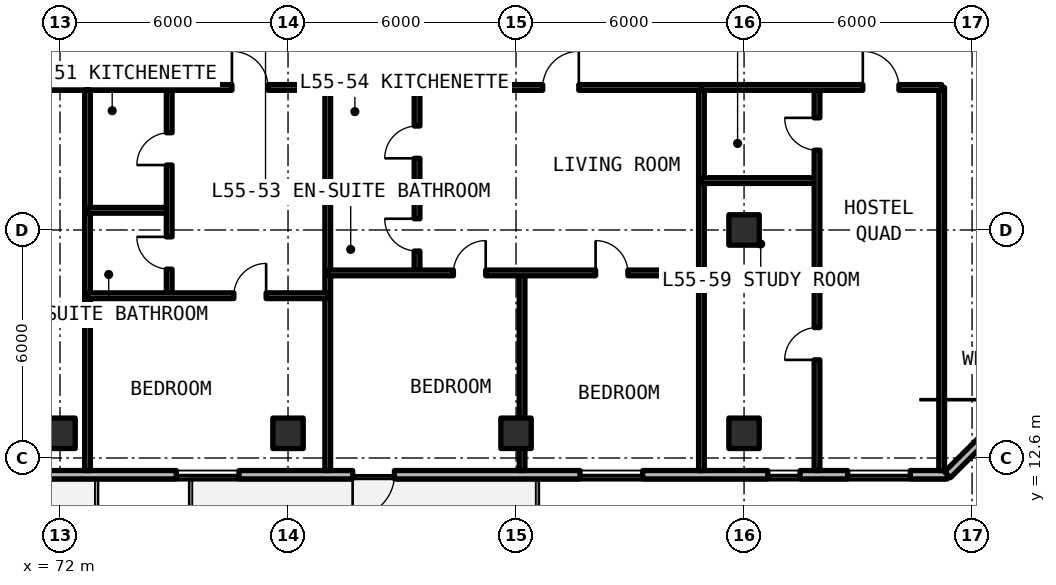
"""IFC4 building model, lengths in metres.
Left out: names, types, materials, properties, quantities, classifications, styles, units other than length and angle.
Written with IfcOpenShell. Run it as: python <this file> out.ifc"""

import sys

from ifc_helpers import new_model, si_unit, direction, frame, frame_2d, origin, origin_2d, place, context, subcontext, project, spatial, rectangle, extrude, element, fill, save


model = new_model("IFC4")
c1 = context("Model", 3, precision=1e-05, world=origin(), true_north=direction((0.0, 1.0)))
c2 = subcontext(c1, "Body", "Model", "MODEL_VIEW")
j1 = project(units=[si_unit("LENGTHUNIT", "METRE"), si_unit("PLANEANGLEUNIT", "RADIAN")], contexts=[c1])
p1 = place(None, origin())
s1 = spatial("IfcSite", under=j1, at=p1, CompositionType="ELEMENT")
p2 = place(p1, origin())
s2 = spatial("IfcBuilding", under=s1, at=p2, CompositionType="ELEMENT")
p3 = place(p2, frame((0.0, 0.0, 198.33)))
s3 = spatial("IfcBuildingStorey", under=s2, at=p3, CompositionType="ELEMENT", Elevation=198.33)
for number, where, z_axis, x_axis in (
    (1, (90.0, 18.6, 0.0), (0.0, 0.0, 1.0), (1.0, 0.0, 0.0)),
    (2, (72.0, 13.25, 0.0), (0.0, 0.0, 1.0), (1.0, 0.0, 0.0)),
    (3, (78.0, 13.25, 0.0), (0.0, 0.0, 1.0), (1.0, 0.0, 0.0)),
    (4, (84.0, 13.25, 0.0), (0.0, 0.0, 1.0), (1.0, 0.0, 0.0)),
    (5, (90.0, 13.25, 0.0), (0.0, 0.0, 1.0), (1.0, 0.0, 0.0)),
):
    element("IfcColumn", number, at=place(p3, frame(where, z_axis=z_axis, x_axis=x_axis)), inside=s3, PredefinedType="COLUMN", context=c2, shape_type="SweptSolid", body=[
        extrude(rectangle(XDim=0.8, YDim=0.8, at=origin_2d()), origin(), (0.0, 0.0, 1.0), 3.3),
    ])
p4 = place(p3, frame((52.11, 12.16, 0.0), z_axis=(0.0, 0.0, 1.0), x_axis=(1.0, 0.0, 0.0)))
e6 = element("IfcWall", 6, at=p4, inside=s3, PredefinedType="SOLIDWALL", context=c2, shape_type="SweptSolid", body=[
    extrude(rectangle(XDim=43.244, YDim=0.22, at=frame_2d((21.622, 0.0))), origin(), (0.0, 0.0, 1.0), 3.08),
])
p5 = place(p4, frame((15.74, 0.0, 0.0)))
e7 = element("IfcOpeningElement", 7, at=p5, cuts=e6, PredefinedType="OPENING", context=c2, shape_type="SweptSolid", body=[
    extrude(rectangle(XDim=1.1, YDim=2.15, at=frame_2d((0.55, 1.075))), frame((0.0, 0.12, 0.0), z_axis=(0.0, -1.0, 0.0), x_axis=(1.0, 0.0, 0.0)), (0.0, 0.0, 1.0), 0.24),
])
p6 = place(p4, frame((27.59, 0.0, 0.0)))
e8 = element("IfcOpeningElement", 8, at=p6, cuts=e6, PredefinedType="OPENING", context=c2, shape_type="SweptSolid", body=[
    extrude(rectangle(XDim=1.1, YDim=2.15, at=frame_2d((0.55, 1.075))), frame((0.0, 0.12, 0.0), z_axis=(0.0, -1.0, 0.0), x_axis=(1.0, 0.0, 0.0)), (0.0, 0.0, 1.0), 0.24),
])
p7 = place(p4, frame((2.795, 0.0, 0.78)))
e9 = element("IfcOpeningElement", 9, at=p7, cuts=e6, PredefinedType="OPENING", context=c2, shape_type="SweptSolid", body=[
    extrude(rectangle(XDim=1.65, YDim=1.66, at=frame_2d((0.825, 0.83))), frame((0.0, 0.12, 0.0), z_axis=(0.0, -1.0, 0.0), x_axis=(1.0, 0.0, 0.0)), (0.0, 0.0, 1.0), 0.24),
])
p8 = place(p4, frame((6.185, 0.0, 0.78)))
e10 = element("IfcOpeningElement", 10, at=p8, cuts=e6, PredefinedType="OPENING", context=c2, shape_type="SweptSolid", body=[
    extrude(rectangle(XDim=0.85, YDim=1.65, at=frame_2d((0.425, 0.825))), frame((0.0, 0.12, 0.0), z_axis=(0.0, -1.0, 0.0), x_axis=(1.0, 0.0, 0.0)), (0.0, 0.0, 1.0), 0.24),
])
p9 = place(p4, frame((10.562, 0.0, 0.78)))
e11 = element("IfcOpeningElement", 11, at=p9, cuts=e6, PredefinedType="OPENING", context=c2, shape_type="SweptSolid", body=[
    extrude(rectangle(XDim=0.85, YDim=1.65, at=frame_2d((0.425, 0.825))), frame((0.0, 0.12, 0.0), z_axis=(0.0, -1.0, 0.0), x_axis=(1.0, 0.0, 0.0)), (0.0, 0.0, 1.0), 0.24),
])
p10 = place(p4, frame((22.949, 0.0, 0.78)))
e12 = element("IfcOpeningElement", 12, at=p10, cuts=e6, PredefinedType="OPENING", context=c2, shape_type="SweptSolid", body=[
    extrude(rectangle(XDim=1.65, YDim=1.66, at=frame_2d((0.825, 0.83))), frame((0.0, 0.12, 0.0), z_axis=(0.0, -1.0, 0.0), x_axis=(1.0, 0.0, 0.0)), (0.0, 0.0, 1.0), 0.24),
])
p11 = place(p4, frame((33.573, 0.0, 0.78)))
e13 = element("IfcOpeningElement", 13, at=p11, cuts=e6, PredefinedType="OPENING", context=c2, shape_type="SweptSolid", body=[
    extrude(rectangle(XDim=1.65, YDim=1.66, at=frame_2d((0.825, 0.83))), frame((0.0, 0.12, 0.0), z_axis=(0.0, -1.0, 0.0), x_axis=(1.0, 0.0, 0.0)), (0.0, 0.0, 1.0), 0.24),
])
p12 = place(p4, frame((38.514, 0.0, 0.78)))
e14 = element("IfcOpeningElement", 14, at=p12, cuts=e6, PredefinedType="OPENING", context=c2, shape_type="SweptSolid", body=[
    extrude(rectangle(XDim=0.85, YDim=1.65, at=frame_2d((0.425, 0.825))), frame((0.0, 0.12, 0.0), z_axis=(0.0, -1.0, 0.0), x_axis=(1.0, 0.0, 0.0)), (0.0, 0.0, 1.0), 0.24),
])
p13 = place(p4, frame((40.615, 0.0, 0.78)))
e15 = element("IfcOpeningElement", 15, at=p13, cuts=e6, PredefinedType="OPENING", context=c2, shape_type="SweptSolid", body=[
    extrude(rectangle(XDim=1.65, YDim=1.66, at=frame_2d((0.825, 0.83))), frame((0.0, 0.12, 0.0), z_axis=(0.0, -1.0, 0.0), x_axis=(1.0, 0.0, 0.0)), (0.0, 0.0, 1.0), 0.24),
])
p14 = place(p3, frame((95.354, 12.16, 0.0), z_axis=(0.0, 0.0, 1.0), x_axis=(0.707085909342, 0.707127652415, 0.0)))
e16 = element("IfcWall", 16, at=p14, inside=s3, PredefinedType="SOLIDWALL", context=c2, shape_type="SweptSolid", body=[
    extrude(rectangle(XDim=5.849, YDim=0.22, at=frame_2d((2.924, 0.0))), origin(), (0.0, 0.0, 1.0), 3.08),
])
p15 = place(p14, frame((1.224, 0.0, 0.78)))
e17 = element("IfcOpeningElement", 17, at=p15, cuts=e16, PredefinedType="OPENING", context=c2, shape_type="SweptSolid", body=[
    extrude(rectangle(XDim=3.4, YDim=1.66, at=frame_2d((1.7, 0.83))), frame((0.0, 0.12, 0.0), z_axis=(0.0, -1.0, 0.0), x_axis=(1.0, 0.0, 0.0)), (0.0, 0.0, 1.0), 0.24),
])
for number, where, z_axis, x_axis in (
    (18, (95.2, 12.27, 0.0), (0.0, 0.0, 1.0), (0.0, 1.0, 0.0)),
    (19, (72.723, 12.27, 0.0), (0.0, 0.0, 1.0), (0.0, 1.0, 0.0)),
):
    element("IfcWall", number, at=place(p3, frame(where, z_axis=z_axis, x_axis=x_axis)), inside=s3, PredefinedType="SOLIDWALL", context=c2, shape_type="SweptSolid", body=[
        extrude(rectangle(XDim=10.08, YDim=0.15, at=frame_2d((5.04, 0.0))), origin(), (0.0, 0.0, 1.0), 2.35),
    ])
p16 = place(p3, frame((64.295, 22.35, 0.0), z_axis=(0.0, 0.0, 1.0), x_axis=(1.0, 0.0, 0.0)))
e20 = element("IfcWall", 20, at=p16, inside=s3, PredefinedType="SOLIDWALL", context=c2, shape_type="SweptSolid", body=[
    extrude(rectangle(XDim=8.428, YDim=0.15, at=frame_2d((4.214, 0.0))), origin(), (0.0, 0.0, 1.0), 2.35),
])
p17 = place(p16, frame((3.664, 0.0, 0.0)))
e21 = element("IfcOpeningElement", 21, at=p17, cuts=e20, PredefinedType="OPENING", context=c2, shape_type="SweptSolid", body=[
    extrude(rectangle(XDim=1.1, YDim=2.15, at=frame_2d((0.55, 1.075))), frame((0.0, 0.085, 0.0), z_axis=(0.0, -1.0, 0.0), x_axis=(1.0, 0.0, 0.0)), (0.0, 0.0, 1.0), 0.17),
])
p18 = place(p3, frame((79.045, 12.27, 0.0), z_axis=(0.0, 0.0, 1.0), x_axis=(0.0, 1.0, 0.0)))
e22 = element("IfcWall", 22, at=p18, inside=s3, PredefinedType="SOLIDWALL", context=c2, shape_type="SweptSolid", body=[
    extrude(rectangle(XDim=10.08, YDim=0.15, at=frame_2d((5.04, 0.0))), origin(), (0.0, 0.0, 1.0), 2.35),
])
p19 = place(p3, frame((72.723, 19.117, 0.0), z_axis=(0.0, 0.0, 1.0), x_axis=(1.0, 0.0, 0.0)))
e23 = element("IfcWall", 23, at=p19, inside=s3, PredefinedType="PARTITIONING", context=c2, shape_type="SweptSolid", body=[
    extrude(rectangle(XDim=2.149, YDim=0.15, at=frame_2d((1.075, 0.0))), origin(), (0.0, 0.0, 1.0), 2.35),
])
p20 = place(p3, frame((74.873, 16.87, 0.0), z_axis=(0.0, 0.0, 1.0), x_axis=(0.0, 1.0, 0.0)))
e24 = element("IfcWall", 24, at=p20, inside=s3, PredefinedType="PARTITIONING", context=c2, shape_type="SweptSolid", body=[
    extrude(rectangle(XDim=5.48, YDim=0.15, at=frame_2d((2.74, 0.0))), origin(), (0.0, 0.0, 1.0), 2.35),
])
p21 = place(p20, frame((0.698, 0.0, 0.0)))
e25 = element("IfcOpeningElement", 25, at=p21, cuts=e24, PredefinedType="OPENING", context=c2, shape_type="SweptSolid", body=[
    extrude(rectangle(XDim=0.85, YDim=2.1, at=frame_2d((0.425, 1.05))), frame((0.0, 0.085, 0.0), z_axis=(0.0, -1.0, 0.0), x_axis=(1.0, 0.0, 0.0)), (0.0, 0.0, 1.0), 0.17),
])
p22 = place(p20, frame((3.438, 0.0, 0.0)))
e26 = element("IfcOpeningElement", 26, at=p22, cuts=e24, PredefinedType="OPENING", context=c2, shape_type="SweptSolid", body=[
    extrude(rectangle(XDim=0.85, YDim=2.1, at=frame_2d((0.425, 1.05))), frame((0.0, 0.085, 0.0), z_axis=(0.0, -1.0, 0.0), x_axis=(1.0, 0.0, 0.0)), (0.0, 0.0, 1.0), 0.17),
])
p23 = place(p3, frame((72.723, 16.87, 0.0), z_axis=(0.0, 0.0, 1.0), x_axis=(1.0, 0.0, 0.0)))
e27 = element("IfcWall", 27, at=p23, inside=s3, PredefinedType="PARTITIONING", context=c2, shape_type="SweptSolid", body=[
    extrude(rectangle(XDim=6.322, YDim=0.15, at=frame_2d((3.161, 0.0))), origin(), (0.0, 0.0, 1.0), 2.35),
])
p24 = place(p23, frame((3.85, 0.0, 0.0)))
e28 = element("IfcOpeningElement", 28, at=p24, cuts=e27, PredefinedType="OPENING", context=c2, shape_type="SweptSolid", body=[
    extrude(rectangle(XDim=0.85, YDim=2.1, at=frame_2d((0.425, 1.05))), frame((0.0, 0.085, 0.0), z_axis=(0.0, -1.0, 0.0), x_axis=(1.0, 0.0, 0.0)), (0.0, 0.0, 1.0), 0.17),
])
p25 = place(p3, frame((72.723, 22.35, 0.0), z_axis=(0.0, 0.0, 1.0), x_axis=(1.0, 0.0, 0.0)))
e29 = element("IfcWall", 29, at=p25, inside=s3, PredefinedType="SOLIDWALL", context=c2, shape_type="SweptSolid", body=[
    extrude(rectangle(XDim=6.322, YDim=0.15, at=frame_2d((3.161, 0.0))), origin(), (0.0, 0.0, 1.0), 2.35),
])
p26 = place(p25, frame((3.8, 0.0, 0.0)))
e30 = element("IfcOpeningElement", 30, at=p26, cuts=e29, PredefinedType="OPENING", context=c2, shape_type="SweptSolid", body=[
    extrude(rectangle(XDim=0.95, YDim=2.15, at=frame_2d((0.475, 1.075))), frame((0.0, 0.085, 0.0), z_axis=(0.0, -1.0, 0.0), x_axis=(1.0, 0.0, 0.0)), (0.0, 0.0, 1.0), 0.17),
])
p27 = place(p3, frame((88.878, 12.27, 0.0), z_axis=(0.0, 0.0, 1.0), x_axis=(0.0, 1.0, 0.0)))
e31 = element("IfcWall", 31, at=p27, inside=s3, PredefinedType="SOLIDWALL", context=c2, shape_type="SweptSolid", body=[
    extrude(rectangle(XDim=10.08, YDim=0.15, at=frame_2d((5.04, 0.0))), origin(), (0.0, 0.0, 1.0), 2.35),
])
p28 = place(p3, frame((79.045, 19.471, 0.0), z_axis=(0.0, 0.0, 1.0), x_axis=(1.0, 0.0, 0.0)))
e32 = element("IfcWall", 32, at=p28, inside=s3, PredefinedType="PARTITIONING", context=c2, shape_type="SweptSolid", body=[
    extrude(rectangle(XDim=2.35, YDim=0.15, at=frame_2d((1.175, 0.0))), origin(), (0.0, 0.0, 1.0), 2.35),
])
p29 = place(p3, frame((81.395, 17.47, 0.0), z_axis=(0.0, 0.0, 1.0), x_axis=(0.0, 1.0, 0.0)))
e33 = element("IfcWall", 33, at=p29, inside=s3, PredefinedType="PARTITIONING", context=c2, shape_type="SweptSolid", body=[
    extrude(rectangle(XDim=4.88, YDim=0.15, at=frame_2d((2.44, 0.0))), origin(), (0.0, 0.0, 1.0), 2.35),
])
p30 = place(p29, frame((0.575, 0.0, 0.0)))
e34 = element("IfcOpeningElement", 34, at=p30, cuts=e33, PredefinedType="OPENING", context=c2, shape_type="SweptSolid", body=[
    extrude(rectangle(XDim=0.85, YDim=2.1, at=frame_2d((0.425, 1.05))), frame((0.0, 0.085, 0.0), z_axis=(0.0, -1.0, 0.0), x_axis=(1.0, 0.0, 0.0)), (0.0, 0.0, 1.0), 0.17),
])
p31 = place(p29, frame((3.015, 0.0, 0.0)))
e35 = element("IfcOpeningElement", 35, at=p31, cuts=e33, PredefinedType="OPENING", context=c2, shape_type="SweptSolid", body=[
    extrude(rectangle(XDim=0.85, YDim=2.1, at=frame_2d((0.425, 1.05))), frame((0.0, 0.085, 0.0), z_axis=(0.0, -1.0, 0.0), x_axis=(1.0, 0.0, 0.0)), (0.0, 0.0, 1.0), 0.17),
])
p32 = place(p3, frame((84.158, 12.27, 0.0), z_axis=(0.0, 0.0, 1.0), x_axis=(0.0, 1.0, 0.0)))
e36 = element("IfcWall", 36, at=p32, inside=s3, PredefinedType="PARTITIONING", context=c2, shape_type="SweptSolid", body=[
    extrude(rectangle(XDim=5.2, YDim=0.15, at=frame_2d((2.6, 0.0))), origin(), (0.0, 0.0, 1.0), 2.35),
])
p33 = place(p3, frame((79.045, 17.47, 0.0), z_axis=(0.0, 0.0, 1.0), x_axis=(1.0, 0.0, 0.0)))
e37 = element("IfcWall", 37, at=p33, inside=s3, PredefinedType="PARTITIONING", context=c2, shape_type="SweptSolid", body=[
    extrude(rectangle(XDim=9.833, YDim=0.15, at=frame_2d((4.917, 0.0))), origin(), (0.0, 0.0, 1.0), 2.35),
])
p34 = place(p33, frame((3.307, 0.0, 0.0)))
e38 = element("IfcOpeningElement", 38, at=p34, cuts=e37, PredefinedType="OPENING", context=c2, shape_type="SweptSolid", body=[
    extrude(rectangle(XDim=0.85, YDim=2.1, at=frame_2d((0.425, 1.05))), frame((0.0, 0.085, 0.0), z_axis=(0.0, -1.0, 0.0), x_axis=(1.0, 0.0, 0.0)), (0.0, 0.0, 1.0), 0.17),
])
p35 = place(p33, frame((7.048, 0.0, 0.0)))
e39 = element("IfcOpeningElement", 39, at=p35, cuts=e37, PredefinedType="OPENING", context=c2, shape_type="SweptSolid", body=[
    extrude(rectangle(XDim=0.85, YDim=2.1, at=frame_2d((0.425, 1.05))), frame((0.0, 0.085, 0.0), z_axis=(0.0, -1.0, 0.0), x_axis=(1.0, 0.0, 0.0)), (0.0, 0.0, 1.0), 0.17),
])
p36 = place(p3, frame((79.045, 22.35, 0.0), z_axis=(0.0, 0.0, 1.0), x_axis=(1.0, 0.0, 0.0)))
e40 = element("IfcWall", 40, at=p36, inside=s3, PredefinedType="SOLIDWALL", context=c2, shape_type="SweptSolid", body=[
    extrude(rectangle(XDim=9.833, YDim=0.15, at=frame_2d((4.917, 0.0))), origin(), (0.0, 0.0, 1.0), 2.35),
])
p37 = place(p36, frame((5.657, 0.0, 0.0)))
e41 = element("IfcOpeningElement", 41, at=p37, cuts=e40, PredefinedType="OPENING", context=c2, shape_type="SweptSolid", body=[
    extrude(rectangle(XDim=0.95, YDim=2.15, at=frame_2d((0.475, 1.075))), frame((0.0, 0.085, 0.0), z_axis=(0.0, -1.0, 0.0), x_axis=(1.0, 0.0, 0.0)), (0.0, 0.0, 1.0), 0.17),
])
p38 = place(p3, frame((88.878, 19.9, 0.0), z_axis=(0.0, 0.0, 1.0), x_axis=(1.0, 0.0, 0.0)))
e42 = element("IfcWall", 42, at=p38, inside=s3, PredefinedType="PARTITIONING", context=c2, shape_type="SweptSolid", body=[
    extrude(rectangle(XDim=3.042, YDim=0.15, at=frame_2d((1.521, 0.0))), origin(), (0.0, 0.0, 1.0), 2.35),
])
p39 = place(p3, frame((91.92, 12.27, 0.0), z_axis=(0.0, 0.0, 1.0), x_axis=(0.0, 1.0, 0.0)))
e43 = element("IfcWall", 43, at=p39, inside=s3, PredefinedType="PARTITIONING", context=c2, shape_type="SweptSolid", body=[
    extrude(rectangle(XDim=10.08, YDim=0.15, at=frame_2d((5.04, 0.0))), origin(), (0.0, 0.0, 1.0), 2.35),
])
p40 = place(p39, frame((2.912, 0.0, 0.0)))
e44 = element("IfcOpeningElement", 44, at=p40, cuts=e43, PredefinedType="OPENING", context=c2, shape_type="SweptSolid", body=[
    extrude(rectangle(XDim=0.85, YDim=2.1, at=frame_2d((0.425, 1.05))), frame((0.0, 0.085, 0.0), z_axis=(0.0, -1.0, 0.0), x_axis=(1.0, 0.0, 0.0)), (0.0, 0.0, 1.0), 0.17),
])
p41 = place(p39, frame((8.43, 0.0, 0.0)))
e45 = element("IfcOpeningElement", 45, at=p41, cuts=e43, PredefinedType="OPENING", context=c2, shape_type="SweptSolid", body=[
    extrude(rectangle(XDim=0.85, YDim=2.1, at=frame_2d((0.425, 1.05))), frame((0.0, 0.085, 0.0), z_axis=(0.0, -1.0, 0.0), x_axis=(1.0, 0.0, 0.0)), (0.0, 0.0, 1.0), 0.17),
])
p42 = place(p3, frame((88.878, 22.35, 0.0), z_axis=(0.0, 0.0, 1.0), x_axis=(1.0, 0.0, 0.0)))
e46 = element("IfcWall", 46, at=p42, inside=s3, PredefinedType="SOLIDWALL", context=c2, shape_type="SweptSolid", body=[
    extrude(rectangle(XDim=6.322, YDim=0.15, at=frame_2d((3.161, 0.0))), origin(), (0.0, 0.0, 1.0), 2.35),
])
p43 = place(p42, frame((4.247, 0.0, 0.0)))
e47 = element("IfcOpeningElement", 47, at=p43, cuts=e46, PredefinedType="OPENING", context=c2, shape_type="SweptSolid", body=[
    extrude(rectangle(XDim=0.95, YDim=2.15, at=frame_2d((0.475, 1.075))), frame((0.0, 0.085, 0.0), z_axis=(0.0, -1.0, 0.0), x_axis=(1.0, 0.0, 0.0)), (0.0, 0.0, 1.0), 0.17),
])
p44 = place(p6, frame((1.1, 0.0, 0.0), z_axis=(0.0, 0.0, 1.0), x_axis=(-1.0, 0.0, 0.0)))
e48 = element("IfcDoor", 48, at=p44, inside=s3, OperationType="SINGLE_SWING_LEFT", PredefinedType="DOOR", context=c2, shape_type="SweptSolid", body=[
    extrude(rectangle(XDim=1.1, YDim=2.15, at=frame_2d((0.55, 1.075))), frame((0.0, 0.025, 0.0), z_axis=(0.0, -1.0, 0.0), x_axis=(1.0, 0.0, 0.0)), (0.0, 0.0, 1.0), 0.05),
])
fill(e8, e48)
p45 = place(p10, origin())
e49 = element("IfcWindow", 49, at=p45, inside=s3, PartitioningType="SINGLE_PANEL", PredefinedType="WINDOW", context=c2, shape_type="SweptSolid", body=[
    extrude(rectangle(XDim=1.65, YDim=1.66, at=frame_2d((0.825, 0.83))), frame((0.0, 0.03, 0.0), z_axis=(0.0, -1.0, 0.0), x_axis=(1.0, 0.0, 0.0)), (0.0, 0.0, 1.0), 0.06),
])
fill(e12, e49)
p46 = place(p11, origin())
e50 = element("IfcWindow", 50, at=p46, inside=s3, PartitioningType="SINGLE_PANEL", PredefinedType="WINDOW", context=c2, shape_type="SweptSolid", body=[
    extrude(rectangle(XDim=1.65, YDim=1.66, at=frame_2d((0.825, 0.83))), frame((0.0, 0.03, 0.0), z_axis=(0.0, -1.0, 0.0), x_axis=(1.0, 0.0, 0.0)), (0.0, 0.0, 1.0), 0.06),
])
fill(e13, e50)
p47 = place(p12, origin())
e51 = element("IfcWindow", 51, at=p47, inside=s3, PartitioningType="SINGLE_PANEL", PredefinedType="WINDOW", context=c2, shape_type="SweptSolid", body=[
    extrude(rectangle(XDim=0.85, YDim=1.65, at=frame_2d((0.425, 0.825))), frame((0.0, 0.03, 0.0), z_axis=(0.0, -1.0, 0.0), x_axis=(1.0, 0.0, 0.0)), (0.0, 0.0, 1.0), 0.06),
])
fill(e14, e51)
p48 = place(p13, origin())
e52 = element("IfcWindow", 52, at=p48, inside=s3, PartitioningType="SINGLE_PANEL", PredefinedType="WINDOW", context=c2, shape_type="SweptSolid", body=[
    extrude(rectangle(XDim=1.65, YDim=1.66, at=frame_2d((0.825, 0.83))), frame((0.0, 0.03, 0.0), z_axis=(0.0, -1.0, 0.0), x_axis=(1.0, 0.0, 0.0)), (0.0, 0.0, 1.0), 0.06),
])
fill(e15, e52)
p49 = place(p21, origin())
e53 = element("IfcDoor", 53, at=p49, inside=s3, OperationType="SINGLE_SWING_RIGHT", PredefinedType="DOOR", context=c2, shape_type="SweptSolid", body=[
    extrude(rectangle(XDim=0.85, YDim=2.1, at=frame_2d((0.425, 1.05))), frame((0.0, 0.025, 0.0), z_axis=(0.0, -1.0, 0.0), x_axis=(1.0, 0.0, 0.0)), (0.0, 0.0, 1.0), 0.05),
])
fill(e25, e53)
p50 = place(p22, origin())
e54 = element("IfcDoor", 54, at=p50, inside=s3, OperationType="SINGLE_SWING_LEFT", PredefinedType="DOOR", context=c2, shape_type="SweptSolid", body=[
    extrude(rectangle(XDim=0.85, YDim=2.1, at=frame_2d((0.425, 1.05))), frame((0.0, 0.025, 0.0), z_axis=(0.0, -1.0, 0.0), x_axis=(1.0, 0.0, 0.0)), (0.0, 0.0, 1.0), 0.05),
])
fill(e26, e54)
p51 = place(p24, origin())
e55 = element("IfcDoor", 55, at=p51, inside=s3, OperationType="SINGLE_SWING_RIGHT", PredefinedType="DOOR", context=c2, shape_type="SweptSolid", body=[
    extrude(rectangle(XDim=0.85, YDim=2.1, at=frame_2d((0.425, 1.05))), frame((0.0, 0.025, 0.0), z_axis=(0.0, -1.0, 0.0), x_axis=(1.0, 0.0, 0.0)), (0.0, 0.0, 1.0), 0.05),
])
fill(e28, e55)
p52 = place(p26, origin())
e56 = element("IfcDoor", 56, at=p52, inside=s3, OperationType="SINGLE_SWING_LEFT", PredefinedType="DOOR", context=c2, shape_type="SweptSolid", body=[
    extrude(rectangle(XDim=0.95, YDim=2.15, at=frame_2d((0.475, 1.075))), frame((0.0, 0.025, 0.0), z_axis=(0.0, -1.0, 0.0), x_axis=(1.0, 0.0, 0.0)), (0.0, 0.0, 1.0), 0.05),
])
fill(e30, e56)
p53 = place(p30, origin())
e57 = element("IfcDoor", 57, at=p53, inside=s3, OperationType="SINGLE_SWING_RIGHT", PredefinedType="DOOR", context=c2, shape_type="SweptSolid", body=[
    extrude(rectangle(XDim=0.85, YDim=2.1, at=frame_2d((0.425, 1.05))), frame((0.0, 0.025, 0.0), z_axis=(0.0, -1.0, 0.0), x_axis=(1.0, 0.0, 0.0)), (0.0, 0.0, 1.0), 0.05),
])
fill(e34, e57)
p54 = place(p31, origin())
e58 = element("IfcDoor", 58, at=p54, inside=s3, OperationType="SINGLE_SWING_LEFT", PredefinedType="DOOR", context=c2, shape_type="SweptSolid", body=[
    extrude(rectangle(XDim=0.85, YDim=2.1, at=frame_2d((0.425, 1.05))), frame((0.0, 0.025, 0.0), z_axis=(0.0, -1.0, 0.0), x_axis=(1.0, 0.0, 0.0)), (0.0, 0.0, 1.0), 0.05),
])
fill(e35, e58)
p55 = place(p34, origin())
e59 = element("IfcDoor", 59, at=p55, inside=s3, OperationType="SINGLE_SWING_RIGHT", PredefinedType="DOOR", context=c2, shape_type="SweptSolid", body=[
    extrude(rectangle(XDim=0.85, YDim=2.1, at=frame_2d((0.425, 1.05))), frame((0.0, 0.025, 0.0), z_axis=(0.0, -1.0, 0.0), x_axis=(1.0, 0.0, 0.0)), (0.0, 0.0, 1.0), 0.05),
])
fill(e38, e59)
p56 = place(p35, origin())
e60 = element("IfcDoor", 60, at=p56, inside=s3, OperationType="SINGLE_SWING_LEFT", PredefinedType="DOOR", context=c2, shape_type="SweptSolid", body=[
    extrude(rectangle(XDim=0.85, YDim=2.1, at=frame_2d((0.425, 1.05))), frame((0.0, 0.025, 0.0), z_axis=(0.0, -1.0, 0.0), x_axis=(1.0, 0.0, 0.0)), (0.0, 0.0, 1.0), 0.05),
])
fill(e39, e60)
p57 = place(p37, origin())
e61 = element("IfcDoor", 61, at=p57, inside=s3, OperationType="SINGLE_SWING_RIGHT", PredefinedType="DOOR", context=c2, shape_type="SweptSolid", body=[
    extrude(rectangle(XDim=0.95, YDim=2.15, at=frame_2d((0.475, 1.075))), frame((0.0, 0.025, 0.0), z_axis=(0.0, -1.0, 0.0), x_axis=(1.0, 0.0, 0.0)), (0.0, 0.0, 1.0), 0.05),
])
fill(e41, e61)
p58 = place(p40, origin())
e62 = element("IfcDoor", 62, at=p58, inside=s3, OperationType="SINGLE_SWING_LEFT", PredefinedType="DOOR", context=c2, shape_type="SweptSolid", body=[
    extrude(rectangle(XDim=0.85, YDim=2.1, at=frame_2d((0.425, 1.05))), frame((0.0, 0.025, 0.0), z_axis=(0.0, -1.0, 0.0), x_axis=(1.0, 0.0, 0.0)), (0.0, 0.0, 1.0), 0.05),
])
fill(e44, e62)
p59 = place(p41, origin())
e63 = element("IfcDoor", 63, at=p59, inside=s3, OperationType="SINGLE_SWING_RIGHT", PredefinedType="DOOR", context=c2, shape_type="SweptSolid", body=[
    extrude(rectangle(XDim=0.85, YDim=2.1, at=frame_2d((0.425, 1.05))), frame((0.0, 0.025, 0.0), z_axis=(0.0, -1.0, 0.0), x_axis=(1.0, 0.0, 0.0)), (0.0, 0.0, 1.0), 0.05),
])
fill(e45, e63)
p60 = place(p43, origin())
e64 = element("IfcDoor", 64, at=p60, inside=s3, OperationType="SINGLE_SWING_LEFT", PredefinedType="DOOR", context=c2, shape_type="SweptSolid", body=[
    extrude(rectangle(XDim=0.95, YDim=2.15, at=frame_2d((0.475, 1.075))), frame((0.0, 0.025, 0.0), z_axis=(0.0, -1.0, 0.0), x_axis=(1.0, 0.0, 0.0)), (0.0, 0.0, 1.0), 0.05),
])
fill(e47, e64)
save(model, sys.argv[1])
